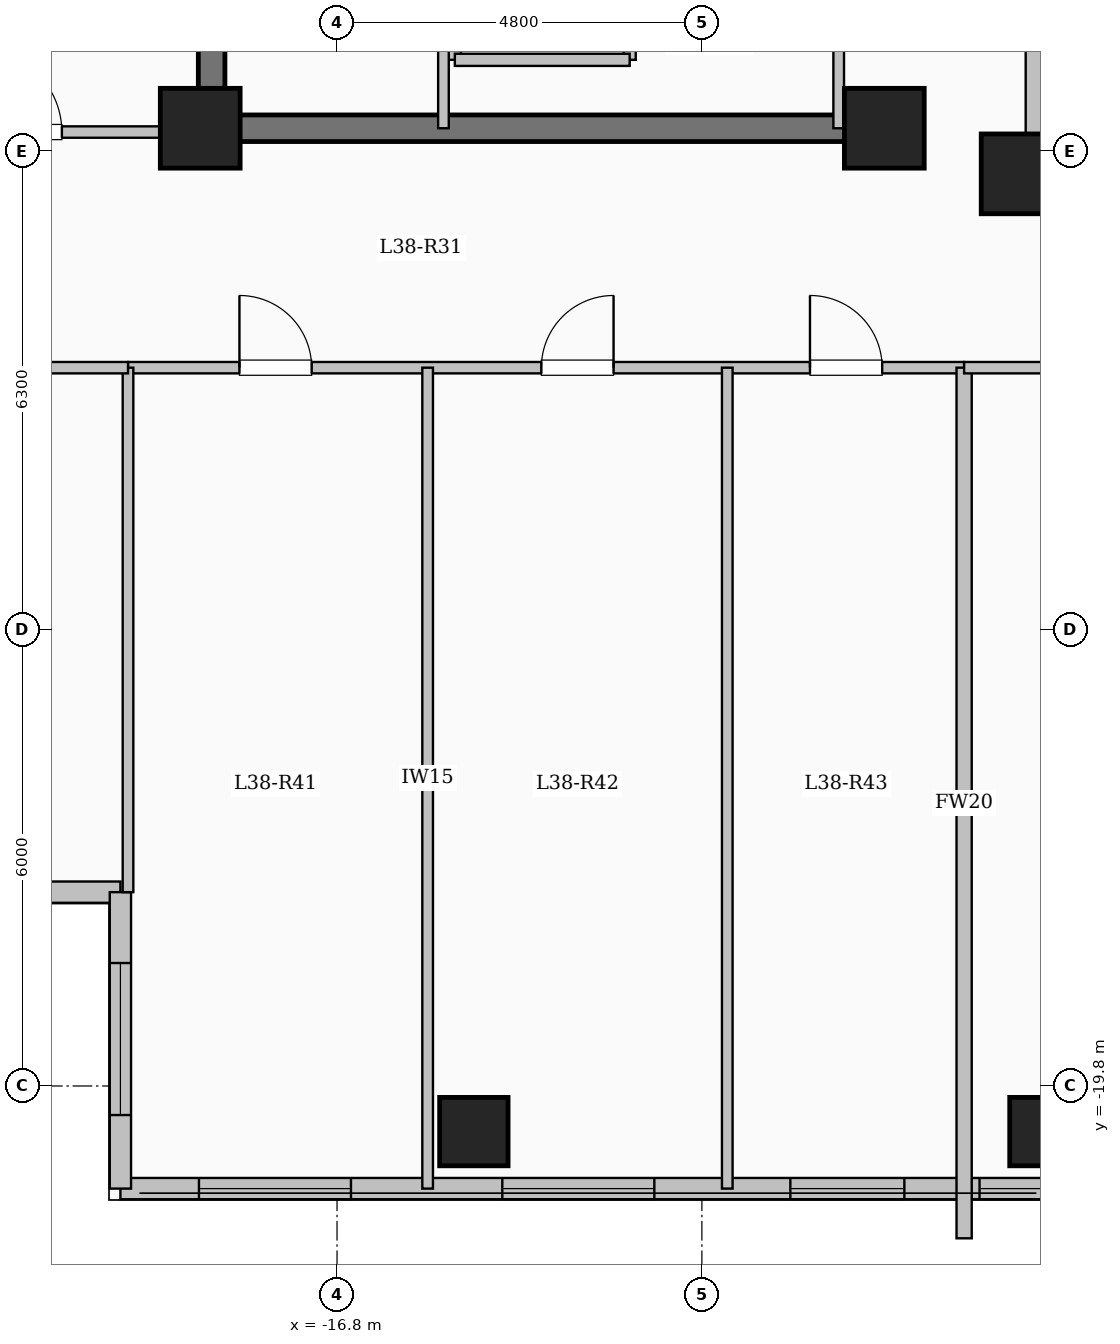
"""IFC4 building model, lengths in metres.
Left out: names, types, materials, properties, quantities, classifications, styles, units other than length and angle.
Written with IfcOpenShell. Run it as: python <this file> out.ifc"""

import sys

from ifc_helpers import new_model, si_unit, direction, frame, frame_2d, origin, origin_2d, place, context, subcontext, project, spatial, rectangle, extrude, element, fill, save


model = new_model("IFC4")
c1 = context("Model", 3, precision=1e-05, world=origin(), true_north=direction((0.0, 1.0)))
c2 = subcontext(c1, "Body", "Model", "MODEL_VIEW")
j1 = project(units=[si_unit("LENGTHUNIT", "METRE"), si_unit("PLANEANGLEUNIT", "RADIAN")], contexts=[c1])
p1 = place(None, origin())
s1 = spatial("IfcSite", under=j1, at=p1, CompositionType="ELEMENT")
p2 = place(p1, origin())
s2 = spatial("IfcBuilding", under=s1, at=p2, CompositionType="ELEMENT")
p3 = place(p2, frame((0.0, 0.0, 142.65)))
s3 = spatial("IfcBuildingStorey", under=s2, at=p3, CompositionType="ELEMENT", Elevation=142.65)
for number, where, z_axis, x_axis in (
    (1, (-7.8, -7.8, 0.0), (0.0, 0.0, 1.0), (1.0, 0.0, 0.0)),
    (2, (-9.6, -7.2, 0.0), (0.0, 0.0, 1.0), (1.0, 0.0, 0.0)),
    (3, (-18.6, -7.2, 0.0), (0.0, 0.0, 1.0), (1.0, 0.0, 0.0)),
):
    element("IfcColumn", number, at=place(p3, frame(where, z_axis=z_axis, x_axis=x_axis)), inside=s3, PredefinedType="COLUMN", context=c2, shape_type="SweptSolid", body=[
        extrude(rectangle(XDim=1.05, YDim=1.05, at=origin_2d()), origin(), (0.0, 0.0, 1.0), 3.35),
    ])
for number, where, z_axis, x_axis in (
    (4, (-15.0, -20.4, 0.0), (0.0, 0.0, 1.0), (1.0, 0.0, 0.0)),
    (5, (-7.5, -20.4, 0.0), (0.0, 0.0, 1.0), (1.0, 0.0, 0.0)),
):
    element("IfcColumn", number, at=place(p3, frame(where, z_axis=z_axis, x_axis=x_axis)), inside=s3, PredefinedType="COLUMN", context=c2, shape_type="SweptSolid", body=[
        extrude(rectangle(XDim=0.9, YDim=0.9, at=origin_2d()), origin(), (0.0, 0.0, 1.0), 3.35),
    ])
p4 = place(p3, frame((-7.62, -7.62, 0.0), z_axis=(0.0, 0.0, 1.0), x_axis=(1.0, 0.0, 0.0)))
e6 = element("IfcWall", 6, at=p4, inside=s3, PredefinedType="SOLIDWALL", context=c2, shape_type="SweptSolid", body=[
    extrude(rectangle(XDim=15.24, YDim=0.24, at=frame_2d((7.62, 0.0))), origin(), (0.0, 0.0, 1.0), 3.1),
])
p5 = place(p4, frame((6.92, 0.0, 0.95)))
e7 = element("IfcOpeningElement", 7, at=p5, cuts=e6, PredefinedType="OPENING", context=c2, shape_type="SweptSolid", body=[
    extrude(rectangle(XDim=1.4, YDim=1.5, at=frame_2d((0.7, 0.75))), frame((0.0, 0.13, 0.0), z_axis=(0.0, -1.0, 0.0), x_axis=(1.0, 0.0, 0.0)), (0.0, 0.0, 1.0), 0.26),
])
p6 = place(p3, frame((-7.62, 7.62, 0.0), z_axis=(0.0, 0.0, 1.0), x_axis=(0.0, -1.0, 0.0)))
e8 = element("IfcWall", 8, at=p6, inside=s3, PredefinedType="SOLIDWALL", context=c2, shape_type="SweptSolid", body=[
    extrude(rectangle(XDim=15.24, YDim=0.24, at=frame_2d((7.62, 0.0))), origin(), (0.0, 0.0, 1.0), 3.1),
])
p7 = place(p6, frame((6.92, 0.0, 0.95)))
e9 = element("IfcOpeningElement", 9, at=p7, cuts=e8, PredefinedType="OPENING", context=c2, shape_type="SweptSolid", body=[
    extrude(rectangle(XDim=1.4, YDim=1.5, at=frame_2d((0.7, 0.75))), frame((0.0, 0.13, 0.0), z_axis=(0.0, -1.0, 0.0), x_axis=(1.0, 0.0, 0.0)), (0.0, 0.0, 1.0), 0.26),
])
p8 = place(p3, frame((-19.65, -17.25, 0.0), z_axis=(0.0, 0.0, 1.0), x_axis=(-1.0, 0.0, 0.0)))
e10 = element("IfcWall", 10, at=p8, inside=s3, PredefinedType="SOLIDWALL", context=c2, shape_type="SweptSolid", body=[
    extrude(rectangle(XDim=5.4, YDim=0.28, at=frame_2d((2.7, 0.0))), origin(), (0.0, 0.0, 1.0), 3.1),
])
p9 = place(p8, frame((1.575, 0.0, 0.9)))
e11 = element("IfcOpeningElement", 11, at=p9, cuts=e10, PredefinedType="OPENING", context=c2, shape_type="SweptSolid", body=[
    extrude(rectangle(XDim=2.2, YDim=1.75, at=frame_2d((1.1, 0.875))), frame((0.0, 0.15, 0.0), z_axis=(0.0, -1.0, 0.0), x_axis=(1.0, 0.0, 0.0)), (0.0, 0.0, 1.0), 0.3),
])
p10 = place(p3, frame((-7.35, -21.15, 0.0), z_axis=(0.0, 0.0, 1.0), x_axis=(-1.0, 0.0, 0.0)))
e12 = element("IfcWall", 12, at=p10, inside=s3, PredefinedType="SOLIDWALL", context=c2, shape_type="SweptSolid", body=[
    extrude(rectangle(XDim=12.3, YDim=0.28, at=frame_2d((6.15, 0.0))), origin(), (0.0, 0.0, 1.0), 3.1),
])
p11 = place(p10, frame((0.147, 0.0, 0.95)))
e13 = element("IfcOpeningElement", 13, at=p11, cuts=e12, PredefinedType="OPENING", context=c2, shape_type="SweptSolid", body=[
    extrude(rectangle(XDim=0.85, YDim=1.5, at=frame_2d((0.425, 0.75))), frame((0.0, 0.15, 0.0), z_axis=(0.0, -1.0, 0.0), x_axis=(1.0, 0.0, 0.0)), (0.0, 0.0, 1.0), 0.3),
])
p12 = place(p10, frame((1.986, 0.0, 0.9)))
e14 = element("IfcOpeningElement", 14, at=p12, cuts=e12, PredefinedType="OPENING", context=c2, shape_type="SweptSolid", body=[
    extrude(rectangle(XDim=1.5, YDim=1.65, at=frame_2d((0.75, 0.825))), frame((0.0, 0.15, 0.0), z_axis=(0.0, -1.0, 0.0), x_axis=(1.0, 0.0, 0.0)), (0.0, 0.0, 1.0), 0.3),
])
p13 = place(p10, frame((5.275, 0.0, 0.9)))
e15 = element("IfcOpeningElement", 15, at=p13, cuts=e12, PredefinedType="OPENING", context=c2, shape_type="SweptSolid", body=[
    extrude(rectangle(XDim=2.0, YDim=1.7, at=frame_2d((1.0, 0.85))), frame((0.0, 0.15, 0.0), z_axis=(0.0, -1.0, 0.0), x_axis=(1.0, 0.0, 0.0)), (0.0, 0.0, 1.0), 0.3),
])
p14 = place(p10, frame((9.267, 0.0, 0.9)))
e16 = element("IfcOpeningElement", 16, at=p14, cuts=e12, PredefinedType="OPENING", context=c2, shape_type="SweptSolid", body=[
    extrude(rectangle(XDim=2.0, YDim=1.7, at=frame_2d((1.0, 0.85))), frame((0.0, 0.15, 0.0), z_axis=(0.0, -1.0, 0.0), x_axis=(1.0, 0.0, 0.0)), (0.0, 0.0, 1.0), 0.3),
])
p15 = place(p3, frame((-19.65, -21.15, 0.0), z_axis=(0.0, 0.0, 1.0), x_axis=(0.0, 1.0, 0.0)))
e17 = element("IfcWall", 17, at=p15, inside=s3, PredefinedType="SOLIDWALL", context=c2, shape_type="SweptSolid", body=[
    extrude(rectangle(XDim=3.9, YDim=0.28, at=frame_2d((1.95, 0.0))), origin(), (0.0, 0.0, 1.0), 3.1),
])
p16 = place(p15, frame((0.968, 0.0, 0.9)))
e18 = element("IfcOpeningElement", 18, at=p16, cuts=e17, PredefinedType="OPENING", context=c2, shape_type="SweptSolid", body=[
    extrude(rectangle(XDim=2.0, YDim=1.7, at=frame_2d((1.0, 0.85))), frame((0.0, 0.15, 0.0), z_axis=(0.0, -1.0, 0.0), x_axis=(1.0, 0.0, 0.0)), (0.0, 0.0, 1.0), 0.3),
])
for number, where, z_axis, x_axis in (
    (19, (-15.25, -6.3, 0.0), (0.0, 0.0, 1.0), (0.0, 1.0, 0.0)),
    (20, (-12.95, -6.3, 0.0), (0.0, 0.0, 1.0), (0.0, 1.0, 0.0)),
):
    element("IfcWall", number, at=place(p3, frame(where, z_axis=z_axis, x_axis=x_axis)), inside=s3, PredefinedType="SOLIDWALL", context=c2, shape_type="SweptSolid", body=[
        extrude(rectangle(XDim=2.6, YDim=0.16, at=frame_2d((1.3, 0.0))), origin(), (0.0, 0.0, 1.0), 3.1),
    ])
p17 = place(p3, frame((-15.25, -6.3, 0.0), z_axis=(0.0, 0.0, 1.0), x_axis=(1.0, 0.0, 0.0)))
e21 = element("IfcWall", 21, at=p17, inside=s3, PredefinedType="SOLIDWALL", context=c2, shape_type="SweptSolid", body=[
    extrude(rectangle(XDim=2.3, YDim=0.16, at=frame_2d((1.15, 0.0))), origin(), (0.0, 0.0, 1.0), 3.1),
])
p18 = place(p3, frame((-18.45, -7.375, 0.0), z_axis=(0.0, 0.0, 1.0), x_axis=(0.0, 1.0, 0.0)))
e22 = element("IfcWall", 22, at=p18, inside=s3, PredefinedType="SHEAR", context=c2, shape_type="SweptSolid", body=[
    extrude(rectangle(XDim=14.05, YDim=0.35, at=frame_2d((7.025, 0.0))), origin(), (0.0, 0.0, 1.0), 3.35),
])
p19 = place(p3, frame((-18.625, -7.2, 0.0), z_axis=(0.0, 0.0, 1.0), x_axis=(1.0, 0.0, 0.0)))
e23 = element("IfcWall", 23, at=p19, inside=s3, PredefinedType="SHEAR", context=c2, shape_type="SweptSolid", body=[
    extrude(rectangle(XDim=8.55, YDim=0.35, at=frame_2d((4.275, 0.0))), origin(), (0.0, 0.0, 1.0), 3.35),
])
p20 = place(p3, frame((-15.4, -7.2, 0.0), z_axis=(0.0, 0.0, 1.0), x_axis=(0.0, 1.0, 0.0)))
e24 = element("IfcWall", 24, at=p20, inside=s3, PredefinedType="PARTITIONING", context=c2, shape_type="SweptSolid", body=[
    extrude(rectangle(XDim=10.45, YDim=0.14, at=frame_2d((5.225, 0.0))), origin(), (0.0, 0.0, 1.0), 3.1),
])
p21 = place(p20, frame((9.25, 0.0, 0.0)))
e25 = element("IfcOpeningElement", 25, at=p21, cuts=e24, PredefinedType="OPENING", context=c2, shape_type="SweptSolid", body=[
    extrude(rectangle(XDim=0.9, YDim=2.08, at=frame_2d((0.45, 1.04))), frame((0.0, 0.08, 0.0), z_axis=(0.0, -1.0, 0.0), x_axis=(1.0, 0.0, 0.0)), (0.0, 0.0, 1.0), 0.16),
])
p22 = place(p3, frame((-10.2, -7.2, 0.0), z_axis=(0.0, 0.0, 1.0), x_axis=(0.0, 1.0, 0.0)))
e26 = element("IfcWall", 26, at=p22, inside=s3, PredefinedType="PARTITIONING", context=c2, shape_type="SweptSolid", body=[
    extrude(rectangle(XDim=9.12, YDim=0.14, at=frame_2d((4.56, 0.0))), origin(), (0.0, 0.0, 1.0), 3.1),
])
p23 = place(p22, frame((1.9, 0.0, 0.0)))
e27 = element("IfcOpeningElement", 27, at=p23, cuts=e26, PredefinedType="OPENING", context=c2, shape_type="SweptSolid", body=[
    extrude(rectangle(XDim=0.95, YDim=2.12, at=frame_2d((0.475, 1.06))), frame((0.0, 0.08, 0.0), z_axis=(0.0, -1.0, 0.0), x_axis=(1.0, 0.0, 0.0)), (0.0, 0.0, 1.0), 0.16),
])
p24 = place(p22, frame((5.0, 0.0, 0.0)))
e28 = element("IfcOpeningElement", 28, at=p24, cuts=e26, PredefinedType="OPENING", context=c2, shape_type="SweptSolid", body=[
    extrude(rectangle(XDim=0.95, YDim=2.12, at=frame_2d((0.475, 1.06))), frame((0.0, 0.08, 0.0), z_axis=(0.0, -1.0, 0.0), x_axis=(1.0, 0.0, 0.0)), (0.0, 0.0, 1.0), 0.16),
])
p25 = place(p3, frame((-19.55, -10.35, 0.0), z_axis=(0.0, 0.0, 1.0), x_axis=(1.0, 0.0, 0.0)))
e29 = element("IfcWall", 29, at=p25, inside=s3, PredefinedType="PARTITIONING", context=c2, shape_type="SweptSolid", body=[
    extrude(rectangle(XDim=11.0, YDim=0.15, at=frame_2d((5.5, 0.0))), origin(), (0.0, 0.0, 1.0), 3.1),
])
p26 = place(p25, frame((1.466, 0.0, 0.0)))
e30 = element("IfcOpeningElement", 30, at=p26, cuts=e29, PredefinedType="OPENING", context=c2, shape_type="SweptSolid", body=[
    extrude(rectangle(XDim=0.95, YDim=2.15, at=frame_2d((0.475, 1.075))), frame((0.0, 0.085, 0.0), z_axis=(0.0, -1.0, 0.0), x_axis=(1.0, 0.0, 0.0)), (0.0, 0.0, 1.0), 0.17),
])
p27 = place(p25, frame((5.438, 0.0, 0.0)))
e31 = element("IfcOpeningElement", 31, at=p27, cuts=e29, PredefinedType="OPENING", context=c2, shape_type="SweptSolid", body=[
    extrude(rectangle(XDim=0.95, YDim=2.15, at=frame_2d((0.475, 1.075))), frame((0.0, 0.085, 0.0), z_axis=(0.0, -1.0, 0.0), x_axis=(1.0, 0.0, 0.0)), (0.0, 0.0, 1.0), 0.17),
])
p28 = place(p25, frame((8.972, 0.0, 0.0)))
e32 = element("IfcOpeningElement", 32, at=p28, cuts=e29, PredefinedType="OPENING", context=c2, shape_type="SweptSolid", body=[
    extrude(rectangle(XDim=0.95, YDim=2.15, at=frame_2d((0.475, 1.075))), frame((0.0, 0.085, 0.0), z_axis=(0.0, -1.0, 0.0), x_axis=(1.0, 0.0, 0.0)), (0.0, 0.0, 1.0), 0.17),
])
for number, where, z_axis, x_axis in (
    (33, (-15.608, -21.15, 0.0), (0.0, 0.0, 1.0), (0.0, 1.0, 0.0)),
    (34, (-11.666, -21.15, 0.0), (0.0, 0.0, 1.0), (0.0, 1.0, 0.0)),
):
    element("IfcWall", number, at=place(p3, frame(where, z_axis=z_axis, x_axis=x_axis)), inside=s3, PredefinedType="PARTITIONING", context=c2, shape_type="SweptSolid", body=[
        extrude(rectangle(XDim=10.8, YDim=0.14, at=frame_2d((5.4, 0.0))), origin(), (0.0, 0.0, 1.0), 3.1),
    ])
p29 = place(p3, frame((-8.55, -21.804, 0.0), z_axis=(0.0, 0.0, 1.0), x_axis=(0.0, 1.0, 0.0)))
e35 = element("IfcWall", 35, at=p29, inside=s3, PredefinedType="SOLIDWALL", context=c2, shape_type="SweptSolid", body=[
    extrude(rectangle(XDim=11.454, YDim=0.2, at=frame_2d((5.727, 0.0))), origin(), (0.0, 0.0, 1.0), 3.1),
])
p30 = place(p3, frame((-8.55, -10.35, 0.0), z_axis=(0.0, 0.0, 1.0), x_axis=(1.0, 0.0, 0.0)))
e36 = element("IfcWall", 36, at=p30, inside=s3, PredefinedType="PARTITIONING", context=c2, shape_type="SweptSolid", body=[
    extrude(rectangle(XDim=17.1, YDim=0.15, at=frame_2d((8.55, 0.0))), origin(), (0.0, 0.0, 1.0), 3.1),
])
p31 = place(p30, frame((1.6, 0.0, 0.0)))
e37 = element("IfcOpeningElement", 37, at=p31, cuts=e36, PredefinedType="OPENING", context=c2, shape_type="SweptSolid", body=[
    extrude(rectangle(XDim=0.96, YDim=2.15, at=frame_2d((0.48, 1.075))), frame((0.0, 0.085, 0.0), z_axis=(0.0, -1.0, 0.0), x_axis=(1.0, 0.0, 0.0)), (0.0, 0.0, 1.0), 0.17),
])
p32 = place(p3, frame((-25.08, -7.25, 0.0), z_axis=(0.0, 0.0, 1.0), x_axis=(1.0, 0.0, 0.0)))
e38 = element("IfcWall", 38, at=p32, inside=s3, PredefinedType="PARTITIONING", context=c2, shape_type="SweptSolid", body=[
    extrude(rectangle(XDim=6.63, YDim=0.15, at=frame_2d((3.315, 0.0))), origin(), (0.0, 0.0, 1.0), 3.1),
])
p33 = place(p32, frame((3.58, 0.0, 0.0)))
e39 = element("IfcOpeningElement", 39, at=p33, cuts=e38, PredefinedType="OPENING", context=c2, shape_type="SweptSolid", body=[
    extrude(rectangle(XDim=1.08, YDim=2.15, at=frame_2d((0.54, 1.075))), frame((0.0, 0.085, 0.0), z_axis=(0.0, -1.0, 0.0), x_axis=(1.0, 0.0, 0.0)), (0.0, 0.0, 1.0), 0.17),
])
p34 = place(p3, frame((-19.55, -17.25, 0.0), z_axis=(0.0, 0.0, 1.0), x_axis=(0.0, 1.0, 0.0)))
e40 = element("IfcWall", 40, at=p34, inside=s3, PredefinedType="PARTITIONING", context=c2, shape_type="SweptSolid", body=[
    extrude(rectangle(XDim=6.9, YDim=0.14, at=frame_2d((3.45, 0.0))), origin(), (0.0, 0.0, 1.0), 3.1),
])
p35 = place(p3, frame((-25.08, -10.35, 0.0), z_axis=(0.0, 0.0, 1.0), x_axis=(1.0, 0.0, 0.0)))
e41 = element("IfcWall", 41, at=p35, inside=s3, PredefinedType="PARTITIONING", context=c2, shape_type="SweptSolid", body=[
    extrude(rectangle(XDim=5.53, YDim=0.15, at=frame_2d((2.765, 0.0))), origin(), (0.0, 0.0, 1.0), 3.1),
])
p36 = place(p35, frame((2.29, 0.0, 0.0)))
e42 = element("IfcOpeningElement", 42, at=p36, cuts=e41, PredefinedType="OPENING", context=c2, shape_type="SweptSolid", body=[
    extrude(rectangle(XDim=0.95, YDim=2.15, at=frame_2d((0.475, 1.075))), frame((0.0, 0.085, 0.0), z_axis=(0.0, -1.0, 0.0), x_axis=(1.0, 0.0, 0.0)), (0.0, 0.0, 1.0), 0.17),
])
p37 = place(p11, origin())
e43 = element("IfcWindow", 43, at=p37, inside=s3, PartitioningType="SINGLE_PANEL", PredefinedType="WINDOW", context=c2, shape_type="SweptSolid", body=[
    extrude(rectangle(XDim=0.85, YDim=1.5, at=frame_2d((0.425, 0.75))), frame((0.0, 0.03, 0.0), z_axis=(0.0, -1.0, 0.0), x_axis=(1.0, 0.0, 0.0)), (0.0, 0.0, 1.0), 0.06),
])
fill(e13, e43)
p38 = place(p12, origin())
e44 = element("IfcWindow", 44, at=p38, inside=s3, PartitioningType="SINGLE_PANEL", PredefinedType="WINDOW", context=c2, shape_type="SweptSolid", body=[
    extrude(rectangle(XDim=1.5, YDim=1.65, at=frame_2d((0.75, 0.825))), frame((0.0, 0.03, 0.0), z_axis=(0.0, -1.0, 0.0), x_axis=(1.0, 0.0, 0.0)), (0.0, 0.0, 1.0), 0.06),
])
fill(e14, e44)
p39 = place(p13, origin())
e45 = element("IfcWindow", 45, at=p39, inside=s3, PartitioningType="SINGLE_PANEL", PredefinedType="WINDOW", context=c2, shape_type="SweptSolid", body=[
    extrude(rectangle(XDim=2.0, YDim=1.7, at=frame_2d((1.0, 0.85))), frame((0.0, 0.03, 0.0), z_axis=(0.0, -1.0, 0.0), x_axis=(1.0, 0.0, 0.0)), (0.0, 0.0, 1.0), 0.06),
])
fill(e15, e45)
p40 = place(p14, origin())
e46 = element("IfcWindow", 46, at=p40, inside=s3, PartitioningType="SINGLE_PANEL", PredefinedType="WINDOW", context=c2, shape_type="SweptSolid", body=[
    extrude(rectangle(XDim=2.0, YDim=1.7, at=frame_2d((1.0, 0.85))), frame((0.0, 0.03, 0.0), z_axis=(0.0, -1.0, 0.0), x_axis=(1.0, 0.0, 0.0)), (0.0, 0.0, 1.0), 0.06),
])
fill(e16, e46)
p41 = place(p16, origin())
e47 = element("IfcWindow", 47, at=p41, inside=s3, PartitioningType="SINGLE_PANEL", PredefinedType="WINDOW", context=c2, shape_type="SweptSolid", body=[
    extrude(rectangle(XDim=2.0, YDim=1.7, at=frame_2d((1.0, 0.85))), frame((0.0, 0.03, 0.0), z_axis=(0.0, -1.0, 0.0), x_axis=(1.0, 0.0, 0.0)), (0.0, 0.0, 1.0), 0.06),
])
fill(e18, e47)
p42 = place(p26, origin())
e48 = element("IfcDoor", 48, at=p42, inside=s3, OperationType="SINGLE_SWING_LEFT", PredefinedType="DOOR", context=c2, shape_type="SweptSolid", body=[
    extrude(rectangle(XDim=0.95, YDim=2.15, at=frame_2d((0.475, 1.075))), frame((0.0, 0.025, 0.0), z_axis=(0.0, -1.0, 0.0), x_axis=(1.0, 0.0, 0.0)), (0.0, 0.0, 1.0), 0.05),
])
fill(e30, e48)
p43 = place(p27, origin())
e49 = element("IfcDoor", 49, at=p43, inside=s3, OperationType="SINGLE_SWING_RIGHT", PredefinedType="DOOR", context=c2, shape_type="SweptSolid", body=[
    extrude(rectangle(XDim=0.95, YDim=2.15, at=frame_2d((0.475, 1.075))), frame((0.0, 0.025, 0.0), z_axis=(0.0, -1.0, 0.0), x_axis=(1.0, 0.0, 0.0)), (0.0, 0.0, 1.0), 0.05),
])
fill(e31, e49)
p44 = place(p28, origin())
e50 = element("IfcDoor", 50, at=p44, inside=s3, OperationType="SINGLE_SWING_LEFT", PredefinedType="DOOR", context=c2, shape_type="SweptSolid", body=[
    extrude(rectangle(XDim=0.95, YDim=2.15, at=frame_2d((0.475, 1.075))), frame((0.0, 0.025, 0.0), z_axis=(0.0, -1.0, 0.0), x_axis=(1.0, 0.0, 0.0)), (0.0, 0.0, 1.0), 0.05),
])
fill(e32, e50)
p45 = place(p33, origin())
e51 = element("IfcDoor", 51, at=p45, inside=s3, OperationType="SINGLE_SWING_LEFT", PredefinedType="DOOR", context=c2, shape_type="SweptSolid", body=[
    extrude(rectangle(XDim=1.08, YDim=2.15, at=frame_2d((0.54, 1.075))), frame((0.0, 0.025, 0.0), z_axis=(0.0, -1.0, 0.0), x_axis=(1.0, 0.0, 0.0)), (0.0, 0.0, 1.0), 0.05),
])
fill(e39, e51)
save(model, sys.argv[1])
